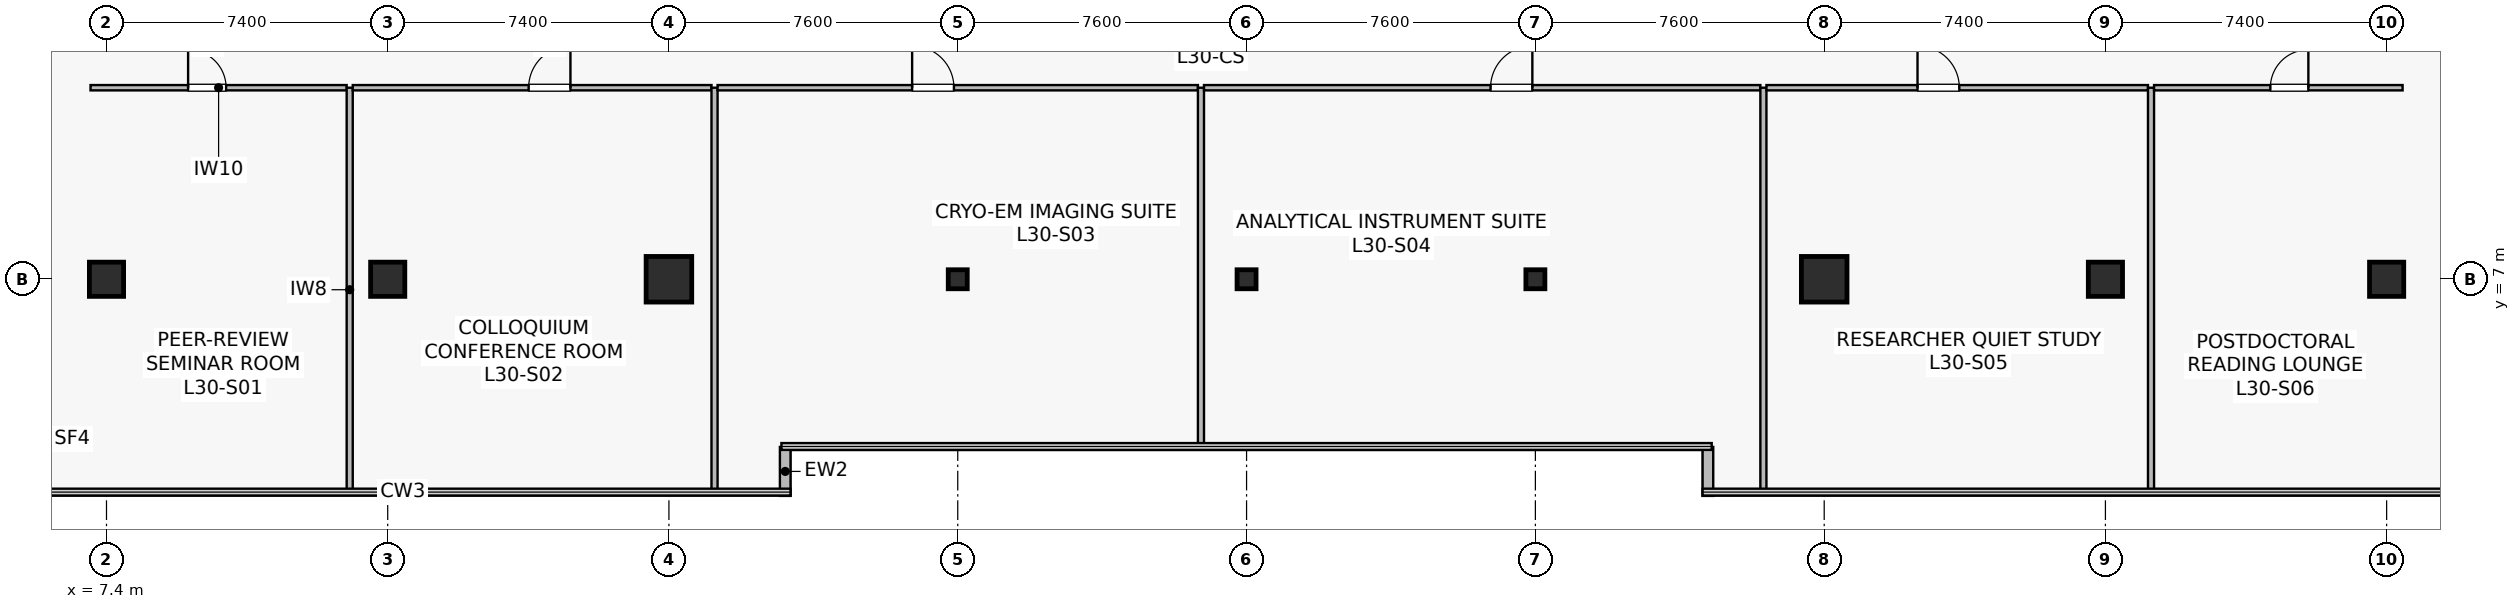
"""IFC4 building model, lengths in metres.
Left out: names, types, materials, properties, quantities, classifications, styles, units other than length and angle.
Written with IfcOpenShell. Run it as: python <this file> out.ifc"""

import sys

from ifc_helpers import new_model, si_unit, direction, frame, frame_2d, origin, origin_2d, place, context, subcontext, project, spatial, rectangle, hollow_rectangle, extrude, source, transform, mapped, element, fill, save


model = new_model("IFC4")
c1 = context("Model", 3, precision=1e-05, world=origin(), true_north=direction((0.0, 1.0)))
c2 = subcontext(c1, "Body", "Model", "MODEL_VIEW")
j1 = project(units=[si_unit("LENGTHUNIT", "METRE"), si_unit("PLANEANGLEUNIT", "RADIAN")], contexts=[c1])
p1 = place(None, origin())
s1 = spatial("IfcSite", under=j1, at=p1, CompositionType="ELEMENT")
p2 = place(p1, origin())
s2 = spatial("IfcBuilding", under=s1, at=p2, CompositionType="ELEMENT")
p3 = place(p2, frame((0.0, 0.0, 125.6)))
s3 = spatial("IfcBuildingStorey", under=s2, at=p3, CompositionType="ELEMENT", Elevation=125.6)
m1 = source(origin(), c2, "Body", "SweptSolid", [
    extrude(rectangle(XDim=0.9, YDim=0.9, at=origin_2d()), origin(), (0.0, 0.0, 1.0), 4.1),
])
p4 = place(p3, frame((14.8, 7.0, 0.0), z_axis=(0.0, 0.0, 1.0), x_axis=(1.0, 0.0, 0.0)))
e1 = element("IfcColumn", 1, at=p4, inside=s3, PredefinedType="COLUMN", context=c2, shape_type="MappedRepresentation", body=[
    mapped(m1, transform((0.0, 0.0, 0.0), scale=1.0)),
])
m2 = source(origin(), c2, "Body", "SweptSolid", [
    extrude(rectangle(XDim=1.2, YDim=1.2, at=origin_2d()), origin(), (0.0, 0.0, 1.0), 4.1),
])
for number, where, z_axis, x_axis in (
    (2, (22.2, 7.0, 0.0), (0.0, 0.0, 1.0), (1.0, 0.0, 0.0)),
    (3, (52.6, 7.0, 0.0), (0.0, 0.0, 1.0), (1.0, 0.0, 0.0)),
):
    element("IfcColumn", number, at=place(p3, frame(where, z_axis=z_axis, x_axis=x_axis)), inside=s3, PredefinedType="COLUMN", context=c2, shape_type="MappedRepresentation", body=[
        mapped(m2, transform((0.0, 0.0, 0.0), scale=1.0)),
    ])
for number, where, z_axis, x_axis in (
    (4, (60.0, 7.0, 0.0), (0.0, 0.0, 1.0), (1.0, 0.0, 0.0)),
    (5, (7.4, 7.0, 0.0), (0.0, 0.0, 1.0), (1.0, 0.0, 0.0)),
    (6, (67.4, 7.0, 0.0), (0.0, 0.0, 1.0), (1.0, 0.0, 0.0)),
):
    element("IfcColumn", number, at=place(p3, frame(where, z_axis=z_axis, x_axis=x_axis)), inside=s3, PredefinedType="COLUMN", context=c2, shape_type="MappedRepresentation", body=[
        mapped(m1, transform((0.0, 0.0, 0.0), scale=1.0)),
    ])
m3 = source(origin(), c2, "Body", "SweptSolid", [
    extrude(hollow_rectangle(XDim=0.5, YDim=0.5, WallThickness=0.022, at=origin_2d()), origin(), (0.0, 0.0, 1.0), 4.1),
])
for number, where, z_axis, x_axis in (
    (7, (29.8, 7.0, 0.0), (0.0, 0.0, 1.0), (1.0, 0.0, 0.0)),
    (8, (37.4, 7.0, 0.0), (0.0, 0.0, 1.0), (1.0, 0.0, 0.0)),
    (9, (45.0, 7.0, 0.0), (0.0, 0.0, 1.0), (1.0, 0.0, 0.0)),
):
    element("IfcColumn", number, at=place(p3, frame(where, z_axis=z_axis, x_axis=x_axis)), inside=s3, PredefinedType="COLUMN", context=c2, shape_type="MappedRepresentation", body=[
        mapped(m3, transform((0.0, 0.0, 0.0), scale=1.0)),
    ])
for number, where, z_axis, x_axis in (
    (10, (25.26, 1.3, 0.0), (0.0, 0.0, 1.0), (0.0, 1.0, 0.0)),
    (11, (49.54, 2.588, 0.0), (0.0, 0.0, 1.0), (0.0, -1.0, 0.0)),
):
    element("IfcWall", number, at=place(p3, frame(where, z_axis=z_axis, x_axis=x_axis)), inside=s3, PredefinedType="STANDARD", context=c2, shape_type="SweptSolid", body=[
        extrude(rectangle(XDim=1.288, YDim=0.28, at=frame_2d((0.644, 0.0))), origin(), (0.0, 0.0, 1.0), 3.79),
    ])
p5 = place(p3, frame((6.98, 12.04, 0.0), z_axis=(0.0, 0.0, 1.0), x_axis=(1.0, 0.0, 0.0)))
e12 = element("IfcWall", 12, at=p5, inside=s3, PredefinedType="PARTITIONING", context=c2, shape_type="SweptSolid", body=[
    extrude(rectangle(XDim=6.74, YDim=0.14, at=frame_2d((3.37, 0.0))), origin(), (0.0, 0.0, 1.0), 3.275),
])
p6 = place(p5, frame((2.568, 0.0, 0.0)))
e13 = element("IfcOpeningElement", 13, at=p6, cuts=e12, PredefinedType="OPENING", context=c2, shape_type="SweptSolid", body=[
    extrude(rectangle(XDim=1.0, YDim=2.15, at=frame_2d((0.5, 1.075))), frame((0.0, 0.08, 0.0), z_axis=(0.0, -1.0, 0.0), x_axis=(1.0, 0.0, 0.0)), (0.0, 0.0, 1.0), 0.16),
])
p7 = place(p3, frame((13.8, 1.41, 0.0), z_axis=(0.0, 0.0, 1.0), x_axis=(0.0, 1.0, 0.0)))
e14 = element("IfcWall", 14, at=p7, inside=s3, PredefinedType="PARTITIONING", context=c2, shape_type="SweptSolid", body=[
    extrude(rectangle(XDim=10.63, YDim=0.16, at=frame_2d((5.315, 0.0))), origin(), (0.0, 0.0, 1.0), 3.075),
])
p8 = place(p3, frame((13.88, 12.04, 0.0), z_axis=(0.0, 0.0, 1.0), x_axis=(1.0, 0.0, 0.0)))
e15 = element("IfcWall", 15, at=p8, inside=s3, PredefinedType="PARTITIONING", context=c2, shape_type="SweptSolid", body=[
    extrude(rectangle(XDim=9.44, YDim=0.14, at=frame_2d((4.72, 0.0))), origin(), (0.0, 0.0, 1.0), 3.125),
])
p9 = place(p8, frame((4.628, 0.0, 0.0)))
e16 = element("IfcOpeningElement", 16, at=p9, cuts=e15, PredefinedType="OPENING", context=c2, shape_type="SweptSolid", body=[
    extrude(rectangle(XDim=1.1, YDim=2.18, at=frame_2d((0.55, 1.09))), frame((0.0, 0.08, 0.0), z_axis=(0.0, -1.0, 0.0), x_axis=(1.0, 0.0, 0.0)), (0.0, 0.0, 1.0), 0.16),
])
p10 = place(p3, frame((23.4, 1.41, 0.0), z_axis=(0.0, 0.0, 1.0), x_axis=(0.0, 1.0, 0.0)))
e17 = element("IfcWall", 17, at=p10, inside=s3, PredefinedType="PARTITIONING", context=c2, shape_type="SweptSolid", body=[
    extrude(rectangle(XDim=10.63, YDim=0.16, at=frame_2d((5.315, 0.0))), origin(), (0.0, 0.0, 1.0), 3.075),
])
p11 = place(p3, frame((23.48, 12.04, 0.0), z_axis=(0.0, 0.0, 1.0), x_axis=(1.0, 0.0, 0.0)))
e18 = element("IfcWall", 18, at=p11, inside=s3, PredefinedType="PARTITIONING", context=c2, shape_type="SweptSolid", body=[
    extrude(rectangle(XDim=12.64, YDim=0.14, at=frame_2d((6.32, 0.0))), origin(), (0.0, 0.0, 1.0), 3.125),
])
p12 = place(p11, frame((5.12, 0.0, 0.0)))
e19 = element("IfcOpeningElement", 19, at=p12, cuts=e18, PredefinedType="OPENING", context=c2, shape_type="SweptSolid", body=[
    extrude(rectangle(XDim=1.1, YDim=2.18, at=frame_2d((0.55, 1.09))), frame((0.0, 0.08, 0.0), z_axis=(0.0, -1.0, 0.0), x_axis=(1.0, 0.0, 0.0)), (0.0, 0.0, 1.0), 0.16),
])
p13 = place(p3, frame((36.2, 2.61, 0.0), z_axis=(0.0, 0.0, 1.0), x_axis=(0.0, 1.0, 0.0)))
e20 = element("IfcWall", 20, at=p13, inside=s3, PredefinedType="PARTITIONING", context=c2, shape_type="SweptSolid", body=[
    extrude(rectangle(XDim=9.43, YDim=0.16, at=frame_2d((4.715, 0.0))), origin(), (0.0, 0.0, 1.0), 3.075),
])
p14 = place(p3, frame((36.28, 12.04, 0.0), z_axis=(0.0, 0.0, 1.0), x_axis=(1.0, 0.0, 0.0)))
e21 = element("IfcWall", 21, at=p14, inside=s3, PredefinedType="PARTITIONING", context=c2, shape_type="SweptSolid", body=[
    extrude(rectangle(XDim=14.64, YDim=0.14, at=frame_2d((7.32, 0.0))), origin(), (0.0, 0.0, 1.0), 3.125),
])
p15 = place(p14, frame((7.54, 0.0, 0.0)))
e22 = element("IfcOpeningElement", 22, at=p15, cuts=e21, PredefinedType="OPENING", context=c2, shape_type="SweptSolid", body=[
    extrude(rectangle(XDim=1.1, YDim=2.18, at=frame_2d((0.55, 1.09))), frame((0.0, 0.08, 0.0), z_axis=(0.0, -1.0, 0.0), x_axis=(1.0, 0.0, 0.0)), (0.0, 0.0, 1.0), 0.16),
])
p16 = place(p3, frame((51.0, 1.41, 0.0), z_axis=(0.0, 0.0, 1.0), x_axis=(0.0, 1.0, 0.0)))
e23 = element("IfcWall", 23, at=p16, inside=s3, PredefinedType="PARTITIONING", context=c2, shape_type="SweptSolid", body=[
    extrude(rectangle(XDim=10.63, YDim=0.16, at=frame_2d((5.315, 0.0))), origin(), (0.0, 0.0, 1.0), 3.075),
])
p17 = place(p3, frame((51.08, 12.04, 0.0), z_axis=(0.0, 0.0, 1.0), x_axis=(1.0, 0.0, 0.0)))
e24 = element("IfcWall", 24, at=p17, inside=s3, PredefinedType="PARTITIONING", context=c2, shape_type="SweptSolid", body=[
    extrude(rectangle(XDim=10.04, YDim=0.14, at=frame_2d((5.02, 0.0))), origin(), (0.0, 0.0, 1.0), 3.125),
])
p18 = place(p17, frame((3.976, 0.0, 0.0)))
e25 = element("IfcOpeningElement", 25, at=p18, cuts=e24, PredefinedType="OPENING", context=c2, shape_type="SweptSolid", body=[
    extrude(rectangle(XDim=1.1, YDim=2.18, at=frame_2d((0.55, 1.09))), frame((0.0, 0.08, 0.0), z_axis=(0.0, -1.0, 0.0), x_axis=(1.0, 0.0, 0.0)), (0.0, 0.0, 1.0), 0.16),
])
p19 = place(p3, frame((61.2, 1.41, 0.0), z_axis=(0.0, 0.0, 1.0), x_axis=(0.0, 1.0, 0.0)))
e26 = element("IfcWall", 26, at=p19, inside=s3, PredefinedType="PARTITIONING", context=c2, shape_type="SweptSolid", body=[
    extrude(rectangle(XDim=10.63, YDim=0.16, at=frame_2d((5.315, 0.0))), origin(), (0.0, 0.0, 1.0), 3.075),
])
p20 = place(p3, frame((61.28, 12.04, 0.0), z_axis=(0.0, 0.0, 1.0), x_axis=(1.0, 0.0, 0.0)))
e27 = element("IfcWall", 27, at=p20, inside=s3, PredefinedType="PARTITIONING", context=c2, shape_type="SweptSolid", body=[
    extrude(rectangle(XDim=6.54, YDim=0.14, at=frame_2d((3.27, 0.0))), origin(), (0.0, 0.0, 1.0), 3.275),
])
p21 = place(p20, frame((3.06, 0.0, 0.0)))
e28 = element("IfcOpeningElement", 28, at=p21, cuts=e27, PredefinedType="OPENING", context=c2, shape_type="SweptSolid", body=[
    extrude(rectangle(XDim=1.0, YDim=2.15, at=frame_2d((0.5, 1.075))), frame((0.0, 0.08, 0.0), z_axis=(0.0, -1.0, 0.0), x_axis=(1.0, 0.0, 0.0)), (0.0, 0.0, 1.0), 0.16),
])
m4 = source(origin(), c2, "Body", "SweptSolid", [
    extrude(rectangle(XDim=1.0, YDim=2.15, at=frame_2d((0.5, 1.075))), frame((0.0, 0.025, 0.0), z_axis=(0.0, -1.0, 0.0), x_axis=(1.0, 0.0, 0.0)), (0.0, 0.0, 1.0), 0.05),
])
p22 = place(p6, origin())
e29 = element("IfcDoor", 29, at=p22, inside=s3, OperationType="SINGLE_SWING_LEFT", PredefinedType="DOOR", context=c2, shape_type="MappedRepresentation", body=[
    mapped(m4, transform((0.0, 0.0, 0.0), scale=1.0)),
])
fill(e13, e29)
m5 = source(origin(), c2, "Body", "SweptSolid", [
    extrude(rectangle(XDim=1.1, YDim=2.18, at=frame_2d((0.55, 1.09))), frame((0.0, 0.025, 0.0), z_axis=(0.0, -1.0, 0.0), x_axis=(1.0, 0.0, 0.0)), (0.0, 0.0, 1.0), 0.05),
])
p23 = place(p9, origin())
e30 = element("IfcDoor", 30, at=p23, inside=s3, OperationType="SINGLE_SWING_RIGHT", PredefinedType="DOOR", context=c2, shape_type="MappedRepresentation", body=[
    mapped(m5, transform((0.0, 0.0, 0.0), scale=1.0)),
])
fill(e16, e30)
p24 = place(p12, origin())
e31 = element("IfcDoor", 31, at=p24, inside=s3, OperationType="SINGLE_SWING_LEFT", PredefinedType="DOOR", context=c2, shape_type="MappedRepresentation", body=[
    mapped(m5, transform((0.0, 0.0, 0.0), scale=1.0)),
])
fill(e19, e31)
p25 = place(p15, origin())
e32 = element("IfcDoor", 32, at=p25, inside=s3, OperationType="SINGLE_SWING_RIGHT", PredefinedType="DOOR", context=c2, shape_type="MappedRepresentation", body=[
    mapped(m5, transform((0.0, 0.0, 0.0), scale=1.0)),
])
fill(e22, e32)
p26 = place(p18, origin())
e33 = element("IfcDoor", 33, at=p26, inside=s3, OperationType="SINGLE_SWING_LEFT", PredefinedType="DOOR", context=c2, shape_type="MappedRepresentation", body=[
    mapped(m5, transform((0.0, 0.0, 0.0), scale=1.0)),
])
fill(e25, e33)
p27 = place(p21, origin())
e34 = element("IfcDoor", 34, at=p27, inside=s3, OperationType="SINGLE_SWING_RIGHT", PredefinedType="DOOR", context=c2, shape_type="MappedRepresentation", body=[
    mapped(m4, transform((0.0, 0.0, 0.0), scale=1.0)),
])
fill(e28, e34)
save(model, sys.argv[1])
